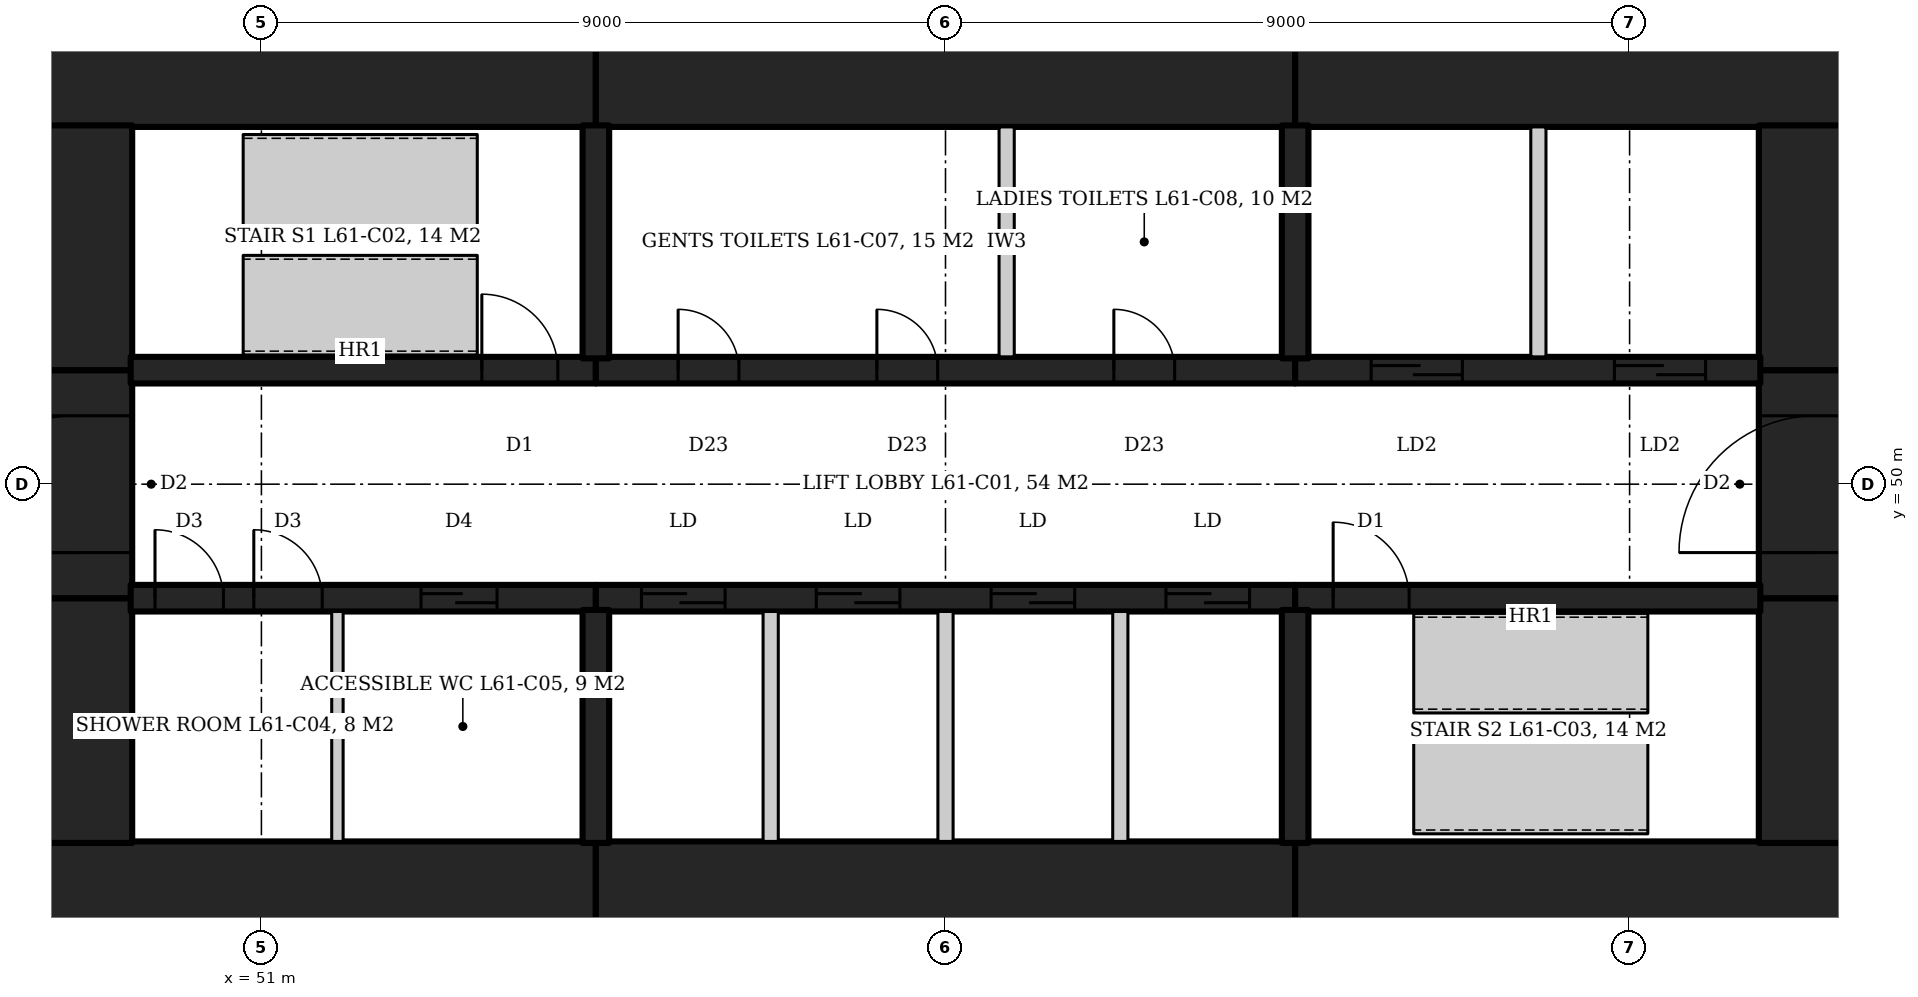
"""IFC4 building model, lengths in metres.
Left out: names, types, materials, properties, quantities, classifications, styles, units other than length and angle.
Written with IfcOpenShell. Run it as: python <this file> out.ifc"""

import sys

from ifc_helpers import new_model, si_unit, direction, frame, frame_2d, origin, place, context, subcontext, project, spatial, rectangle, extrude, element, fill, save


model = new_model("IFC4")
c1 = context("Model", 3, precision=1e-05, world=origin(), true_north=direction((0.0, 1.0)))
c2 = subcontext(c1, "Body", "Model", "MODEL_VIEW")
j1 = project(units=[si_unit("LENGTHUNIT", "METRE"), si_unit("PLANEANGLEUNIT", "RADIAN")], contexts=[c1])
p1 = place(None, origin())
s1 = spatial("IfcSite", under=j1, at=p1, CompositionType="ELEMENT")
p2 = place(p1, origin())
s2 = spatial("IfcBuilding", under=s1, at=p2, CompositionType="ELEMENT")
p3 = place(p2, frame((0.0, 0.0, 261.2)))
s3 = spatial("IfcBuildingStorey", under=s2, at=p3, CompositionType="ELEMENT", Elevation=261.2)
p4 = place(p3, frame((47.8, 55.45, 0.0), z_axis=(0.0, 0.0, 1.0), x_axis=(1.0, 0.0, 0.0)))
e1 = element("IfcWall", 1, at=p4, inside=s3, PredefinedType="SHEAR", context=c2, shape_type="SweptSolid", body=[
    extrude(rectangle(XDim=7.6, YDim=1.5, at=frame_2d((3.8, 0.0))), origin(), (0.0, 0.0, 1.0), 4.2),
])
p5 = place(p3, frame((55.4, 55.45, 0.0), z_axis=(0.0, 0.0, 1.0), x_axis=(1.0, 0.0, 0.0)))
e2 = element("IfcWall", 2, at=p5, inside=s3, PredefinedType="SHEAR", context=c2, shape_type="SweptSolid", body=[
    extrude(rectangle(XDim=9.2, YDim=1.5, at=frame_2d((4.6, 0.0))), origin(), (0.0, 0.0, 1.0), 4.2),
])
for number, where, z_axis, x_axis in (
    (3, (64.6, 55.45, 0.0), (0.0, 0.0, 1.0), (1.0, 0.0, 0.0)),
    (4, (47.8, 44.55, 0.0), (0.0, 0.0, 1.0), (1.0, 0.0, 0.0)),
):
    element("IfcWall", number, at=place(p3, frame(where, z_axis=z_axis, x_axis=x_axis)), inside=s3, PredefinedType="SHEAR", context=c2, shape_type="SweptSolid", body=[
        extrude(rectangle(XDim=7.6, YDim=1.5, at=frame_2d((3.8, 0.0))), origin(), (0.0, 0.0, 1.0), 4.2),
    ])
p6 = place(p3, frame((55.4, 44.55, 0.0), z_axis=(0.0, 0.0, 1.0), x_axis=(1.0, 0.0, 0.0)))
e5 = element("IfcWall", 5, at=p6, inside=s3, PredefinedType="SHEAR", context=c2, shape_type="SweptSolid", body=[
    extrude(rectangle(XDim=9.2, YDim=1.5, at=frame_2d((4.6, 0.0))), origin(), (0.0, 0.0, 1.0), 4.2),
])
p7 = place(p3, frame((64.6, 44.55, 0.0), z_axis=(0.0, 0.0, 1.0), x_axis=(1.0, 0.0, 0.0)))
e6 = element("IfcWall", 6, at=p7, inside=s3, PredefinedType="SHEAR", context=c2, shape_type="SweptSolid", body=[
    extrude(rectangle(XDim=7.6, YDim=1.5, at=frame_2d((3.8, 0.0))), origin(), (0.0, 0.0, 1.0), 4.2),
])
p8 = place(p3, frame((71.45, 45.28, 0.0), z_axis=(0.0, 0.0, 1.0), x_axis=(0.0, 1.0, 0.0)))
e7 = element("IfcWall", 7, at=p8, inside=s3, PredefinedType="SHEAR", context=c2, shape_type="SweptSolid", body=[
    extrude(rectangle(XDim=3.22, YDim=1.5, at=frame_2d((1.61, 0.0))), origin(), (0.0, 0.0, 1.0), 4.2),
])
p9 = place(p3, frame((71.45, 48.5, 0.0), z_axis=(0.0, 0.0, 1.0), x_axis=(0.0, 1.0, 0.0)))
e8 = element("IfcWall", 8, at=p9, inside=s3, PredefinedType="SHEAR", context=c2, shape_type="SweptSolid", body=[
    extrude(rectangle(XDim=3.0, YDim=1.5, at=frame_2d((1.5, 0.0))), origin(), (0.0, 0.0, 1.0), 4.2),
])
p10 = place(p9, frame((0.6, 0.0, 0.0)))
e9 = element("IfcOpeningElement", 9, at=p10, cuts=e8, PredefinedType="OPENING", context=c2, shape_type="SweptSolid", body=[
    extrude(rectangle(XDim=1.8, YDim=2.1, at=frame_2d((0.9, 1.05))), frame((0.0, 0.76, 0.0), z_axis=(0.0, -1.0, 0.0), x_axis=(1.0, 0.0, 0.0)), (0.0, 0.0, 1.0), 1.52),
])
for number, where, z_axis, x_axis in (
    (10, (71.45, 51.5, 0.0), (0.0, 0.0, 1.0), (0.0, 1.0, 0.0)),
    (11, (48.55, 45.28, 0.0), (0.0, 0.0, 1.0), (0.0, 1.0, 0.0)),
):
    element("IfcWall", number, at=place(p3, frame(where, z_axis=z_axis, x_axis=x_axis)), inside=s3, PredefinedType="SHEAR", context=c2, shape_type="SweptSolid", body=[
        extrude(rectangle(XDim=3.22, YDim=1.5, at=frame_2d((1.61, 0.0))), origin(), (0.0, 0.0, 1.0), 4.2),
    ])
p11 = place(p3, frame((48.55, 48.5, 0.0), z_axis=(0.0, 0.0, 1.0), x_axis=(0.0, 1.0, 0.0)))
e12 = element("IfcWall", 12, at=p11, inside=s3, PredefinedType="SHEAR", context=c2, shape_type="SweptSolid", body=[
    extrude(rectangle(XDim=3.0, YDim=1.5, at=frame_2d((1.5, 0.0))), origin(), (0.0, 0.0, 1.0), 4.2),
])
p12 = place(p11, frame((0.6, 0.0, 0.0)))
e13 = element("IfcOpeningElement", 13, at=p12, cuts=e12, PredefinedType="OPENING", context=c2, shape_type="SweptSolid", body=[
    extrude(rectangle(XDim=1.8, YDim=2.1, at=frame_2d((0.9, 1.05))), frame((0.0, 0.76, 0.0), z_axis=(0.0, -1.0, 0.0), x_axis=(1.0, 0.0, 0.0)), (0.0, 0.0, 1.0), 1.52),
])
p13 = place(p3, frame((48.55, 51.5, 0.0), z_axis=(0.0, 0.0, 1.0), x_axis=(0.0, 1.0, 0.0)))
e14 = element("IfcWall", 14, at=p13, inside=s3, PredefinedType="SHEAR", context=c2, shape_type="SweptSolid", body=[
    extrude(rectangle(XDim=3.22, YDim=1.5, at=frame_2d((1.61, 0.0))), origin(), (0.0, 0.0, 1.0), 4.2),
])
p14 = place(p3, frame((49.28, 51.5, 0.0), z_axis=(0.0, 0.0, 1.0), x_axis=(1.0, 0.0, 0.0)))
e15 = element("IfcWall", 15, at=p14, inside=s3, PredefinedType="SHEAR", context=c2, shape_type="SweptSolid", body=[
    extrude(rectangle(XDim=6.12, YDim=0.35, at=frame_2d((3.06, 0.0))), origin(), (0.0, 0.0, 1.0), 4.2),
])
p15 = place(p14, frame((4.62, 0.0, 0.0)))
e16 = element("IfcOpeningElement", 16, at=p15, cuts=e15, PredefinedType="OPENING", context=c2, shape_type="SweptSolid", body=[
    extrude(rectangle(XDim=1.0, YDim=2.1, at=frame_2d((0.5, 1.05))), frame((0.0, 0.185, 0.0), z_axis=(0.0, -1.0, 0.0), x_axis=(1.0, 0.0, 0.0)), (0.0, 0.0, 1.0), 0.37),
])
p16 = place(p3, frame((55.4, 51.5, 0.0), z_axis=(0.0, 0.0, 1.0), x_axis=(1.0, 0.0, 0.0)))
e17 = element("IfcWall", 17, at=p16, inside=s3, PredefinedType="SHEAR", context=c2, shape_type="SweptSolid", body=[
    extrude(rectangle(XDim=9.2, YDim=0.35, at=frame_2d((4.6, 0.0))), origin(), (0.0, 0.0, 1.0), 4.2),
])
p17 = place(p16, frame((1.083, 0.0, 0.0)))
e18 = element("IfcOpeningElement", 18, at=p17, cuts=e17, PredefinedType="OPENING", context=c2, shape_type="SweptSolid", body=[
    extrude(rectangle(XDim=0.8, YDim=2.1, at=frame_2d((0.4, 1.05))), frame((0.0, 0.185, 0.0), z_axis=(0.0, -1.0, 0.0), x_axis=(1.0, 0.0, 0.0)), (0.0, 0.0, 1.0), 0.37),
])
p18 = place(p16, frame((3.697, 0.0, 0.0)))
e19 = element("IfcOpeningElement", 19, at=p18, cuts=e17, PredefinedType="OPENING", context=c2, shape_type="SweptSolid", body=[
    extrude(rectangle(XDim=0.8, YDim=2.1, at=frame_2d((0.4, 1.05))), frame((0.0, 0.185, 0.0), z_axis=(0.0, -1.0, 0.0), x_axis=(1.0, 0.0, 0.0)), (0.0, 0.0, 1.0), 0.37),
])
p19 = place(p16, frame((6.815, 0.0, 0.0)))
e20 = element("IfcOpeningElement", 20, at=p19, cuts=e17, PredefinedType="OPENING", context=c2, shape_type="SweptSolid", body=[
    extrude(rectangle(XDim=0.8, YDim=2.1, at=frame_2d((0.4, 1.05))), frame((0.0, 0.185, 0.0), z_axis=(0.0, -1.0, 0.0), x_axis=(1.0, 0.0, 0.0)), (0.0, 0.0, 1.0), 0.37),
])
p20 = place(p3, frame((64.6, 51.5, 0.0), z_axis=(0.0, 0.0, 1.0), x_axis=(1.0, 0.0, 0.0)))
e21 = element("IfcWall", 21, at=p20, inside=s3, PredefinedType="SHEAR", context=c2, shape_type="SweptSolid", body=[
    extrude(rectangle(XDim=6.12, YDim=0.35, at=frame_2d((3.06, 0.0))), origin(), (0.0, 0.0, 1.0), 4.2),
])
p21 = place(p20, frame((1.0, 0.0, 0.0)))
e22 = element("IfcOpeningElement", 22, at=p21, cuts=e21, PredefinedType="OPENING", context=c2, shape_type="SweptSolid", body=[
    extrude(rectangle(XDim=1.2, YDim=2.1, at=frame_2d((0.6, 1.05))), frame((0.0, 0.185, 0.0), z_axis=(0.0, -1.0, 0.0), x_axis=(1.0, 0.0, 0.0)), (0.0, 0.0, 1.0), 0.37),
])
p22 = place(p20, frame((4.2, 0.0, 0.0)))
e23 = element("IfcOpeningElement", 23, at=p22, cuts=e21, PredefinedType="OPENING", context=c2, shape_type="SweptSolid", body=[
    extrude(rectangle(XDim=1.2, YDim=2.1, at=frame_2d((0.6, 1.05))), frame((0.0, 0.185, 0.0), z_axis=(0.0, -1.0, 0.0), x_axis=(1.0, 0.0, 0.0)), (0.0, 0.0, 1.0), 0.37),
])
p23 = place(p3, frame((49.28, 48.5, 0.0), z_axis=(0.0, 0.0, 1.0), x_axis=(1.0, 0.0, 0.0)))
e24 = element("IfcWall", 24, at=p23, inside=s3, PredefinedType="SHEAR", context=c2, shape_type="SweptSolid", body=[
    extrude(rectangle(XDim=6.12, YDim=0.35, at=frame_2d((3.06, 0.0))), origin(), (0.0, 0.0, 1.0), 4.2),
])
p24 = place(p23, frame((0.32, 0.0, 0.0)))
e25 = element("IfcOpeningElement", 25, at=p24, cuts=e24, PredefinedType="OPENING", context=c2, shape_type="SweptSolid", body=[
    extrude(rectangle(XDim=0.9, YDim=2.1, at=frame_2d((0.45, 1.05))), frame((0.0, 0.185, 0.0), z_axis=(0.0, -1.0, 0.0), x_axis=(1.0, 0.0, 0.0)), (0.0, 0.0, 1.0), 0.37),
])
p25 = place(p23, frame((1.62, 0.0, 0.0)))
e26 = element("IfcOpeningElement", 26, at=p25, cuts=e24, PredefinedType="OPENING", context=c2, shape_type="SweptSolid", body=[
    extrude(rectangle(XDim=0.9, YDim=2.1, at=frame_2d((0.45, 1.05))), frame((0.0, 0.185, 0.0), z_axis=(0.0, -1.0, 0.0), x_axis=(1.0, 0.0, 0.0)), (0.0, 0.0, 1.0), 0.37),
])
p26 = place(p23, frame((3.82, 0.0, 0.0)))
e27 = element("IfcOpeningElement", 27, at=p26, cuts=e24, PredefinedType="OPENING", context=c2, shape_type="SweptSolid", body=[
    extrude(rectangle(XDim=1.0, YDim=2.1, at=frame_2d((0.5, 1.05))), frame((0.0, 0.185, 0.0), z_axis=(0.0, -1.0, 0.0), x_axis=(1.0, 0.0, 0.0)), (0.0, 0.0, 1.0), 0.37),
])
p27 = place(p3, frame((55.4, 48.5, 0.0), z_axis=(0.0, 0.0, 1.0), x_axis=(1.0, 0.0, 0.0)))
e28 = element("IfcWall", 28, at=p27, inside=s3, PredefinedType="SHEAR", context=c2, shape_type="SweptSolid", body=[
    extrude(rectangle(XDim=9.2, YDim=0.35, at=frame_2d((4.6, 0.0))), origin(), (0.0, 0.0, 1.0), 4.2),
])
p28 = place(p27, frame((0.6, 0.0, 0.0)))
e29 = element("IfcOpeningElement", 29, at=p28, cuts=e28, PredefinedType="OPENING", context=c2, shape_type="SweptSolid", body=[
    extrude(rectangle(XDim=1.1, YDim=2.1, at=frame_2d((0.55, 1.05))), frame((0.0, 0.185, 0.0), z_axis=(0.0, -1.0, 0.0), x_axis=(1.0, 0.0, 0.0)), (0.0, 0.0, 1.0), 0.37),
])
p29 = place(p27, frame((2.9, 0.0, 0.0)))
e30 = element("IfcOpeningElement", 30, at=p29, cuts=e28, PredefinedType="OPENING", context=c2, shape_type="SweptSolid", body=[
    extrude(rectangle(XDim=1.1, YDim=2.1, at=frame_2d((0.55, 1.05))), frame((0.0, 0.185, 0.0), z_axis=(0.0, -1.0, 0.0), x_axis=(1.0, 0.0, 0.0)), (0.0, 0.0, 1.0), 0.37),
])
p30 = place(p27, frame((5.2, 0.0, 0.0)))
e31 = element("IfcOpeningElement", 31, at=p30, cuts=e28, PredefinedType="OPENING", context=c2, shape_type="SweptSolid", body=[
    extrude(rectangle(XDim=1.1, YDim=2.1, at=frame_2d((0.55, 1.05))), frame((0.0, 0.185, 0.0), z_axis=(0.0, -1.0, 0.0), x_axis=(1.0, 0.0, 0.0)), (0.0, 0.0, 1.0), 0.37),
])
p31 = place(p27, frame((7.5, 0.0, 0.0)))
e32 = element("IfcOpeningElement", 32, at=p31, cuts=e28, PredefinedType="OPENING", context=c2, shape_type="SweptSolid", body=[
    extrude(rectangle(XDim=1.1, YDim=2.1, at=frame_2d((0.55, 1.05))), frame((0.0, 0.185, 0.0), z_axis=(0.0, -1.0, 0.0), x_axis=(1.0, 0.0, 0.0)), (0.0, 0.0, 1.0), 0.37),
])
p32 = place(p3, frame((64.6, 48.5, 0.0), z_axis=(0.0, 0.0, 1.0), x_axis=(1.0, 0.0, 0.0)))
e33 = element("IfcWall", 33, at=p32, inside=s3, PredefinedType="SHEAR", context=c2, shape_type="SweptSolid", body=[
    extrude(rectangle(XDim=6.12, YDim=0.35, at=frame_2d((3.06, 0.0))), origin(), (0.0, 0.0, 1.0), 4.2),
])
p33 = place(p32, frame((0.5, 0.0, 0.0)))
e34 = element("IfcOpeningElement", 34, at=p33, cuts=e33, PredefinedType="OPENING", context=c2, shape_type="SweptSolid", body=[
    extrude(rectangle(XDim=1.0, YDim=2.1, at=frame_2d((0.5, 1.05))), frame((0.0, 0.185, 0.0), z_axis=(0.0, -1.0, 0.0), x_axis=(1.0, 0.0, 0.0)), (0.0, 0.0, 1.0), 0.37),
])
for number, where, z_axis, x_axis in (
    (35, (55.4, 51.655, 0.0), (0.0, 0.0, 1.0), (0.0, 1.0, 0.0)),
    (36, (64.6, 51.655, 0.0), (0.0, 0.0, 1.0), (0.0, 1.0, 0.0)),
    (37, (55.4, 48.345, 0.0), (0.0, 0.0, 1.0), (0.0, -1.0, 0.0)),
    (38, (64.6, 48.345, 0.0), (0.0, 0.0, 1.0), (0.0, -1.0, 0.0)),
):
    element("IfcWall", number, at=place(p3, frame(where, z_axis=z_axis, x_axis=x_axis)), inside=s3, PredefinedType="SHEAR", context=c2, shape_type="SweptSolid", body=[
        extrude(rectangle(XDim=3.065, YDim=0.35, at=frame_2d((1.532, 0.0))), origin(), (0.0, 0.0, 1.0), 4.2),
    ])
for number, where, z_axis, x_axis in (
    (39, (57.7, 45.3, 0.0), (0.0, 0.0, 1.0), (0.0, 1.0, 0.0)),
    (40, (60.0, 45.3, 0.0), (0.0, 0.0, 1.0), (0.0, 1.0, 0.0)),
    (41, (62.3, 45.3, 0.0), (0.0, 0.0, 1.0), (0.0, 1.0, 0.0)),
    (42, (67.8, 51.675, 0.0), (0.0, 0.0, 1.0), (0.0, 1.0, 0.0)),
):
    element("IfcWall", number, at=place(p3, frame(where, z_axis=z_axis, x_axis=x_axis)), inside=s3, PredefinedType="PARTITIONING", context=c2, shape_type="SweptSolid", body=[
        extrude(rectangle(XDim=3.025, YDim=0.2, at=frame_2d((1.512, 0.0))), origin(), (0.0, 0.0, 1.0), 4.2),
    ])
p34 = place(p3, frame((52.0, 45.3, 0.0), z_axis=(0.0, 0.0, 1.0), x_axis=(0.0, 1.0, 0.0)))
e43 = element("IfcWall", 43, at=p34, inside=s3, PredefinedType="PARTITIONING", context=c2, shape_type="SweptSolid", body=[
    extrude(rectangle(XDim=3.025, YDim=0.15, at=frame_2d((1.512, 0.0))), origin(), (0.0, 0.0, 1.0), 4.04),
])
p35 = place(p3, frame((60.804, 51.675, 0.0), z_axis=(0.0, 0.0, 1.0), x_axis=(0.0, 1.0, 0.0)))
e44 = element("IfcWall", 44, at=p35, inside=s3, PredefinedType="PARTITIONING", context=c2, shape_type="SweptSolid", body=[
    extrude(rectangle(XDim=3.025, YDim=0.2, at=frame_2d((1.512, 0.0))), origin(), (0.0, 0.0, 1.0), 4.04),
])
p36 = place(p15, origin())
e45 = element("IfcDoor", 45, at=p36, inside=s3, OperationType="SINGLE_SWING_LEFT", PredefinedType="DOOR", context=c2, shape_type="SweptSolid", body=[
    extrude(rectangle(XDim=1.0, YDim=2.1, at=frame_2d((0.5, 1.05))), frame((0.0, 0.025, 0.0), z_axis=(0.0, -1.0, 0.0), x_axis=(1.0, 0.0, 0.0)), (0.0, 0.0, 1.0), 0.05),
])
fill(e16, e45)
p37 = place(p33, origin())
e46 = element("IfcDoor", 46, at=p37, inside=s3, OperationType="SINGLE_SWING_LEFT", PredefinedType="DOOR", context=c2, shape_type="SweptSolid", body=[
    extrude(rectangle(XDim=1.0, YDim=2.1, at=frame_2d((0.5, 1.05))), frame((0.0, 0.025, 0.0), z_axis=(0.0, -1.0, 0.0), x_axis=(1.0, 0.0, 0.0)), (0.0, 0.0, 1.0), 0.05),
])
fill(e34, e46)
p38 = place(p21, origin())
e47 = element("IfcDoor", 47, at=p38, inside=s3, OperationType="SLIDING_TO_LEFT", PredefinedType="DOOR", context=c2, shape_type="SweptSolid", body=[
    extrude(rectangle(XDim=1.2, YDim=2.1, at=frame_2d((0.6, 1.05))), frame((0.0, 0.025, 0.0), z_axis=(0.0, -1.0, 0.0), x_axis=(1.0, 0.0, 0.0)), (0.0, 0.0, 1.0), 0.05),
])
fill(e22, e47)
p39 = place(p22, origin())
e48 = element("IfcDoor", 48, at=p39, inside=s3, OperationType="SLIDING_TO_LEFT", PredefinedType="DOOR", context=c2, shape_type="SweptSolid", body=[
    extrude(rectangle(XDim=1.2, YDim=2.1, at=frame_2d((0.6, 1.05))), frame((0.0, 0.025, 0.0), z_axis=(0.0, -1.0, 0.0), x_axis=(1.0, 0.0, 0.0)), (0.0, 0.0, 1.0), 0.05),
])
fill(e23, e48)
p40 = place(p28, origin())
e49 = element("IfcDoor", 49, at=p40, inside=s3, OperationType="SLIDING_TO_LEFT", PredefinedType="DOOR", context=c2, shape_type="SweptSolid", body=[
    extrude(rectangle(XDim=1.1, YDim=2.1, at=frame_2d((0.55, 1.05))), frame((0.0, 0.025, 0.0), z_axis=(0.0, -1.0, 0.0), x_axis=(1.0, 0.0, 0.0)), (0.0, 0.0, 1.0), 0.05),
])
fill(e29, e49)
p41 = place(p29, origin())
e50 = element("IfcDoor", 50, at=p41, inside=s3, OperationType="SLIDING_TO_LEFT", PredefinedType="DOOR", context=c2, shape_type="SweptSolid", body=[
    extrude(rectangle(XDim=1.1, YDim=2.1, at=frame_2d((0.55, 1.05))), frame((0.0, 0.025, 0.0), z_axis=(0.0, -1.0, 0.0), x_axis=(1.0, 0.0, 0.0)), (0.0, 0.0, 1.0), 0.05),
])
fill(e30, e50)
p42 = place(p30, origin())
e51 = element("IfcDoor", 51, at=p42, inside=s3, OperationType="SLIDING_TO_LEFT", PredefinedType="DOOR", context=c2, shape_type="SweptSolid", body=[
    extrude(rectangle(XDim=1.1, YDim=2.1, at=frame_2d((0.55, 1.05))), frame((0.0, 0.025, 0.0), z_axis=(0.0, -1.0, 0.0), x_axis=(1.0, 0.0, 0.0)), (0.0, 0.0, 1.0), 0.05),
])
fill(e31, e51)
p43 = place(p31, origin())
e52 = element("IfcDoor", 52, at=p43, inside=s3, OperationType="SLIDING_TO_LEFT", PredefinedType="DOOR", context=c2, shape_type="SweptSolid", body=[
    extrude(rectangle(XDim=1.1, YDim=2.1, at=frame_2d((0.55, 1.05))), frame((0.0, 0.025, 0.0), z_axis=(0.0, -1.0, 0.0), x_axis=(1.0, 0.0, 0.0)), (0.0, 0.0, 1.0), 0.05),
])
fill(e32, e52)
p44 = place(p24, origin())
e53 = element("IfcDoor", 53, at=p44, inside=s3, OperationType="SINGLE_SWING_RIGHT", PredefinedType="DOOR", context=c2, shape_type="SweptSolid", body=[
    extrude(rectangle(XDim=0.9, YDim=2.1, at=frame_2d((0.45, 1.05))), frame((0.0, 0.025, 0.0), z_axis=(0.0, -1.0, 0.0), x_axis=(1.0, 0.0, 0.0)), (0.0, 0.0, 1.0), 0.05),
])
fill(e25, e53)
p45 = place(p25, origin())
e54 = element("IfcDoor", 54, at=p45, inside=s3, OperationType="SINGLE_SWING_RIGHT", PredefinedType="DOOR", context=c2, shape_type="SweptSolid", body=[
    extrude(rectangle(XDim=0.9, YDim=2.1, at=frame_2d((0.45, 1.05))), frame((0.0, 0.025, 0.0), z_axis=(0.0, -1.0, 0.0), x_axis=(1.0, 0.0, 0.0)), (0.0, 0.0, 1.0), 0.05),
])
fill(e26, e54)
p46 = place(p26, origin())
e55 = element("IfcDoor", 55, at=p46, inside=s3, OperationType="SLIDING_TO_LEFT", PredefinedType="DOOR", context=c2, shape_type="SweptSolid", body=[
    extrude(rectangle(XDim=1.0, YDim=2.1, at=frame_2d((0.5, 1.05))), frame((0.0, 0.025, 0.0), z_axis=(0.0, -1.0, 0.0), x_axis=(1.0, 0.0, 0.0)), (0.0, 0.0, 1.0), 0.05),
])
fill(e27, e55)
p47 = place(p10, origin())
e56 = element("IfcDoor", 56, at=p47, inside=s3, OperationType="DOUBLE_DOOR_DOUBLE_SWING", PredefinedType="DOOR", context=c2, shape_type="SweptSolid", body=[
    extrude(rectangle(XDim=1.8, YDim=2.1, at=frame_2d((0.9, 1.05))), frame((0.0, 0.025, 0.0), z_axis=(0.0, -1.0, 0.0), x_axis=(1.0, 0.0, 0.0)), (0.0, 0.0, 1.0), 0.05),
])
fill(e9, e56)
p48 = place(p12, origin())
e57 = element("IfcDoor", 57, at=p48, inside=s3, OperationType="DOUBLE_DOOR_DOUBLE_SWING", PredefinedType="DOOR", context=c2, shape_type="SweptSolid", body=[
    extrude(rectangle(XDim=1.8, YDim=2.1, at=frame_2d((0.9, 1.05))), frame((0.0, 0.025, 0.0), z_axis=(0.0, -1.0, 0.0), x_axis=(1.0, 0.0, 0.0)), (0.0, 0.0, 1.0), 0.05),
])
fill(e13, e57)
p49 = place(p17, origin())
e58 = element("IfcDoor", 58, at=p49, inside=s3, OperationType="SINGLE_SWING_LEFT", PredefinedType="DOOR", context=c2, shape_type="SweptSolid", body=[
    extrude(rectangle(XDim=0.8, YDim=2.1, at=frame_2d((0.4, 1.05))), frame((0.0, 0.025, 0.0), z_axis=(0.0, -1.0, 0.0), x_axis=(1.0, 0.0, 0.0)), (0.0, 0.0, 1.0), 0.05),
])
fill(e18, e58)
p50 = place(p18, origin())
e59 = element("IfcDoor", 59, at=p50, inside=s3, OperationType="SINGLE_SWING_LEFT", PredefinedType="DOOR", context=c2, shape_type="SweptSolid", body=[
    extrude(rectangle(XDim=0.8, YDim=2.1, at=frame_2d((0.4, 1.05))), frame((0.0, 0.025, 0.0), z_axis=(0.0, -1.0, 0.0), x_axis=(1.0, 0.0, 0.0)), (0.0, 0.0, 1.0), 0.05),
])
fill(e19, e59)
p51 = place(p19, origin())
e60 = element("IfcDoor", 60, at=p51, inside=s3, OperationType="SINGLE_SWING_LEFT", PredefinedType="DOOR", context=c2, shape_type="SweptSolid", body=[
    extrude(rectangle(XDim=0.8, YDim=2.1, at=frame_2d((0.4, 1.05))), frame((0.0, 0.025, 0.0), z_axis=(0.0, -1.0, 0.0), x_axis=(1.0, 0.0, 0.0)), (0.0, 0.0, 1.0), 0.05),
])
fill(e20, e60)
save(model, sys.argv[1])
